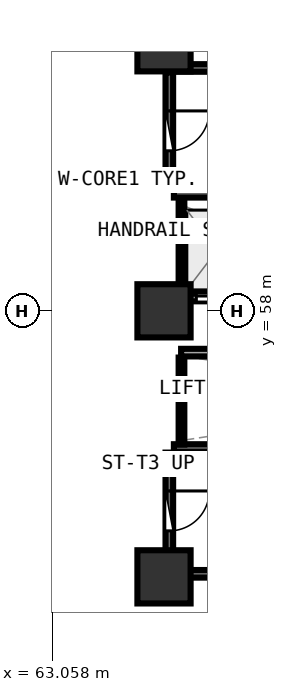
"""IFC4 building model, lengths in metres.
Left out: names, types, materials, properties, quantities, classifications, styles, units other than length and angle.
Written with IfcOpenShell. Run it as: python <this file> out.ifc"""

import sys

from ifc_helpers import new_model, si_unit, direction, frame, frame_2d, origin, origin_2d, place, context, subcontext, project, spatial, rectangle, extrude, element, fill, save


model = new_model("IFC4")
c1 = context("Model", 3, precision=1e-05, world=origin(), true_north=direction((0.0, 1.0)))
c2 = subcontext(c1, "Body", "Model", "MODEL_VIEW")
j1 = project(units=[si_unit("LENGTHUNIT", "METRE"), si_unit("PLANEANGLEUNIT", "RADIAN")], contexts=[c1])
p1 = place(None, origin())
s1 = spatial("IfcSite", under=j1, at=p1, CompositionType="ELEMENT")
p2 = place(p1, origin())
s2 = spatial("IfcBuilding", under=s1, at=p2, CompositionType="ELEMENT")
p3 = place(p2, frame((0.0, 0.0, 22.5)))
s3 = spatial("IfcBuildingStorey", under=s2, at=p3, CompositionType="ELEMENT", Elevation=22.5)
for number, where, z_axis, x_axis in (
    (1, (66.0, 51.0, 0.0), (0.0, 0.0, 1.0), (1.0, 0.0, 0.0)),
    (2, (66.0, 65.0, 0.0), (0.0, 0.0, 1.0), (1.0, 0.0, 0.0)),
    (3, (66.0, 58.0, 0.0), (0.0, 0.0, 1.0), (1.0, 0.0, 0.0)),
):
    element("IfcColumn", number, at=place(p3, frame(where, z_axis=z_axis, x_axis=x_axis)), inside=s3, PredefinedType="PILASTER", context=c2, shape_type="SweptSolid", body=[
        extrude(rectangle(XDim=1.4, YDim=1.4, at=origin_2d()), origin(), (0.0, 0.0, 1.0), 3.75),
    ])
for number, where, z_axis, x_axis in (
    (4, (66.26, 61.08, 0.0), (0.0, 0.0, 1.0), (1.0, 0.0, 0.0)),
    (5, (73.42, 64.39, 0.0), (0.0, 0.0, 1.0), (-1.0, 0.0, 0.0)),
):
    element("IfcWall", number, at=place(p3, frame(where, z_axis=z_axis, x_axis=x_axis)), inside=s3, PredefinedType="SHEAR", context=c2, shape_type="SweptSolid", body=[
        extrude(rectangle(XDim=7.16, YDim=0.2, at=frame_2d((3.58, 0.0))), origin(), (0.0, 0.0, 1.0), 3.49),
    ])
p4 = place(p3, frame((66.14, 64.27, 0.0), z_axis=(0.0, 0.0, 1.0), x_axis=(0.0, -1.0, 0.0)))
e6 = element("IfcWall", 6, at=p4, inside=s3, PredefinedType="SHEAR", context=c2, shape_type="SweptSolid", body=[
    extrude(rectangle(XDim=3.07, YDim=0.2, at=frame_2d((1.535, 0.0))), origin(), (0.0, 0.0, 1.0), 3.49),
])
p5 = place(p4, frame((1.01, 0.0, 0.0)))
e7 = element("IfcOpeningElement", 7, at=p5, cuts=e6, PredefinedType="OPENING", context=c2, shape_type="SweptSolid", body=[
    extrude(rectangle(XDim=1.05, YDim=2.1, at=frame_2d((0.525, 1.05))), frame((0.0, 0.11, 0.0), z_axis=(0.0, -1.0, 0.0), x_axis=(1.0, 0.0, 0.0)), (0.0, 0.0, 1.0), 0.22),
])
for number, where, z_axis, x_axis in (
    (8, (66.26, 51.08, 0.0), (0.0, 0.0, 1.0), (1.0, 0.0, 0.0)),
    (9, (73.42, 54.39, 0.0), (0.0, 0.0, 1.0), (-1.0, 0.0, 0.0)),
):
    element("IfcWall", number, at=place(p3, frame(where, z_axis=z_axis, x_axis=x_axis)), inside=s3, PredefinedType="SHEAR", context=c2, shape_type="SweptSolid", body=[
        extrude(rectangle(XDim=7.16, YDim=0.2, at=frame_2d((3.58, 0.0))), origin(), (0.0, 0.0, 1.0), 3.49),
    ])
p6 = place(p3, frame((66.14, 54.27, 0.0), z_axis=(0.0, 0.0, 1.0), x_axis=(0.0, -1.0, 0.0)))
e10 = element("IfcWall", 10, at=p6, inside=s3, PredefinedType="SHEAR", context=c2, shape_type="SweptSolid", body=[
    extrude(rectangle(XDim=3.07, YDim=0.2, at=frame_2d((1.535, 0.0))), origin(), (0.0, 0.0, 1.0), 3.49),
])
p7 = place(p6, frame((1.01, 0.0, 0.0)))
e11 = element("IfcOpeningElement", 11, at=p7, cuts=e10, PredefinedType="OPENING", context=c2, shape_type="SweptSolid", body=[
    extrude(rectangle(XDim=1.05, YDim=2.1, at=frame_2d((0.525, 1.05))), frame((0.0, 0.11, 0.0), z_axis=(0.0, -1.0, 0.0), x_axis=(1.0, 0.0, 0.0)), (0.0, 0.0, 1.0), 0.22),
])
p8 = place(p3, frame((66.45, 58.35, 0.0), z_axis=(0.0, 0.0, 1.0), x_axis=(1.0, 0.0, 0.0)))
e12 = element("IfcWall", 12, at=p8, inside=s3, PredefinedType="SOLIDWALL", context=c2, shape_type="SweptSolid", body=[
    extrude(rectangle(XDim=6.0, YDim=0.2, at=frame_2d((3.0, 0.0))), origin(), (0.0, 0.0, 1.0), 3.48),
])
p9 = place(p8, frame((0.4, 0.0, 0.0)))
e13 = element("IfcOpeningElement", 13, at=p9, cuts=e12, PredefinedType="OPENING", context=c2, shape_type="SweptSolid", body=[
    extrude(rectangle(XDim=1.1, YDim=2.1, at=frame_2d((0.55, 1.05))), frame((0.0, 0.11, 0.0), z_axis=(0.0, -1.0, 0.0), x_axis=(1.0, 0.0, 0.0)), (0.0, 0.0, 1.0), 0.22),
])
p10 = place(p8, frame((2.4, 0.0, 0.0)))
e14 = element("IfcOpeningElement", 14, at=p10, cuts=e12, PredefinedType="OPENING", context=c2, shape_type="SweptSolid", body=[
    extrude(rectangle(XDim=1.1, YDim=2.1, at=frame_2d((0.55, 1.05))), frame((0.0, 0.11, 0.0), z_axis=(0.0, -1.0, 0.0), x_axis=(1.0, 0.0, 0.0)), (0.0, 0.0, 1.0), 0.22),
])
p11 = place(p8, frame((4.4, 0.0, 0.0)))
e15 = element("IfcOpeningElement", 15, at=p11, cuts=e12, PredefinedType="OPENING", context=c2, shape_type="SweptSolid", body=[
    extrude(rectangle(XDim=1.1, YDim=2.1, at=frame_2d((0.55, 1.05))), frame((0.0, 0.11, 0.0), z_axis=(0.0, -1.0, 0.0), x_axis=(1.0, 0.0, 0.0)), (0.0, 0.0, 1.0), 0.22),
])
p12 = place(p3, frame((66.46, 58.48, 0.0), z_axis=(0.0, 0.0, 1.0), x_axis=(0.0, 1.0, 0.0)))
e16 = element("IfcWall", 16, at=p12, inside=s3, PredefinedType="PARTITIONING", context=c2, shape_type="SweptSolid", body=[
    extrude(rectangle(XDim=2.46, YDim=0.15, at=frame_2d((1.23, 0.0))), origin(), (0.0, 0.0, 1.0), 3.48),
])
p13 = place(p3, frame((66.45, 56.9, 0.0), z_axis=(0.0, 0.0, 1.0), x_axis=(1.0, 0.0, 0.0)))
e17 = element("IfcWall", 17, at=p13, inside=s3, PredefinedType="SOLIDWALL", context=c2, shape_type="SweptSolid", body=[
    extrude(rectangle(XDim=14.4, YDim=0.2, at=frame_2d((7.2, 0.0))), origin(), (0.0, 0.0, 1.0), 3.48),
])
p14 = place(p3, frame((66.46, 54.48, 0.0), z_axis=(0.0, 0.0, 1.0), x_axis=(0.0, 1.0, 0.0)))
e18 = element("IfcWall", 18, at=p14, inside=s3, PredefinedType="PARTITIONING", context=c2, shape_type="SweptSolid", body=[
    extrude(rectangle(XDim=2.29, YDim=0.15, at=frame_2d((1.145, 0.0))), origin(), (0.0, 0.0, 1.0), 3.48),
])
p15 = place(p3, frame((64.446, 68.507, 0.0), z_axis=(0.0, 0.0, 1.0), x_axis=(-0.660323401664, -0.75098136143, 0.0)))
e19 = element("IfcWall", 19, at=p15, inside=s3, PredefinedType="PARTITIONING", context=c2, shape_type="SweptSolid", body=[
    extrude(rectangle(XDim=5.857, YDim=0.12, at=frame_2d((2.929, 0.0))), origin(), (0.0, 0.0, 1.0), 2.875),
])
p16 = place(p15, frame((2.479, 0.0, 0.0)))
e20 = element("IfcOpeningElement", 20, at=p16, cuts=e19, PredefinedType="OPENING", context=c2, shape_type="SweptSolid", body=[
    extrude(rectangle(XDim=0.9, YDim=2.08, at=frame_2d((0.45, 1.04))), frame((0.0, 0.07, 0.0), z_axis=(0.0, -1.0, 0.0), x_axis=(1.0, 0.0, 0.0)), (0.0, 0.0, 1.0), 0.14),
])
p17 = place(p5, origin())
e21 = element("IfcDoor", 21, at=p17, inside=s3, OperationType="SINGLE_SWING_LEFT", PredefinedType="DOOR", context=c2, shape_type="SweptSolid", body=[
    extrude(rectangle(XDim=1.05, YDim=2.1, at=frame_2d((0.525, 1.05))), frame((0.0, 0.025, 0.0), z_axis=(0.0, -1.0, 0.0), x_axis=(1.0, 0.0, 0.0)), (0.0, 0.0, 1.0), 0.05),
])
fill(e7, e21)
p18 = place(p7, origin())
e22 = element("IfcDoor", 22, at=p18, inside=s3, OperationType="SINGLE_SWING_LEFT", PredefinedType="DOOR", context=c2, shape_type="SweptSolid", body=[
    extrude(rectangle(XDim=1.05, YDim=2.1, at=frame_2d((0.525, 1.05))), frame((0.0, 0.025, 0.0), z_axis=(0.0, -1.0, 0.0), x_axis=(1.0, 0.0, 0.0)), (0.0, 0.0, 1.0), 0.05),
])
fill(e11, e22)
p19 = place(p9, origin())
e23 = element("IfcDoor", 23, at=p19, inside=s3, OperationType="DOUBLE_DOOR_SLIDING", PredefinedType="DOOR", context=c2, shape_type="SweptSolid", body=[
    extrude(rectangle(XDim=1.1, YDim=2.1, at=frame_2d((0.55, 1.05))), frame((0.0, 0.025, 0.0), z_axis=(0.0, -1.0, 0.0), x_axis=(1.0, 0.0, 0.0)), (0.0, 0.0, 1.0), 0.05),
])
fill(e13, e23)
save(model, sys.argv[1])
